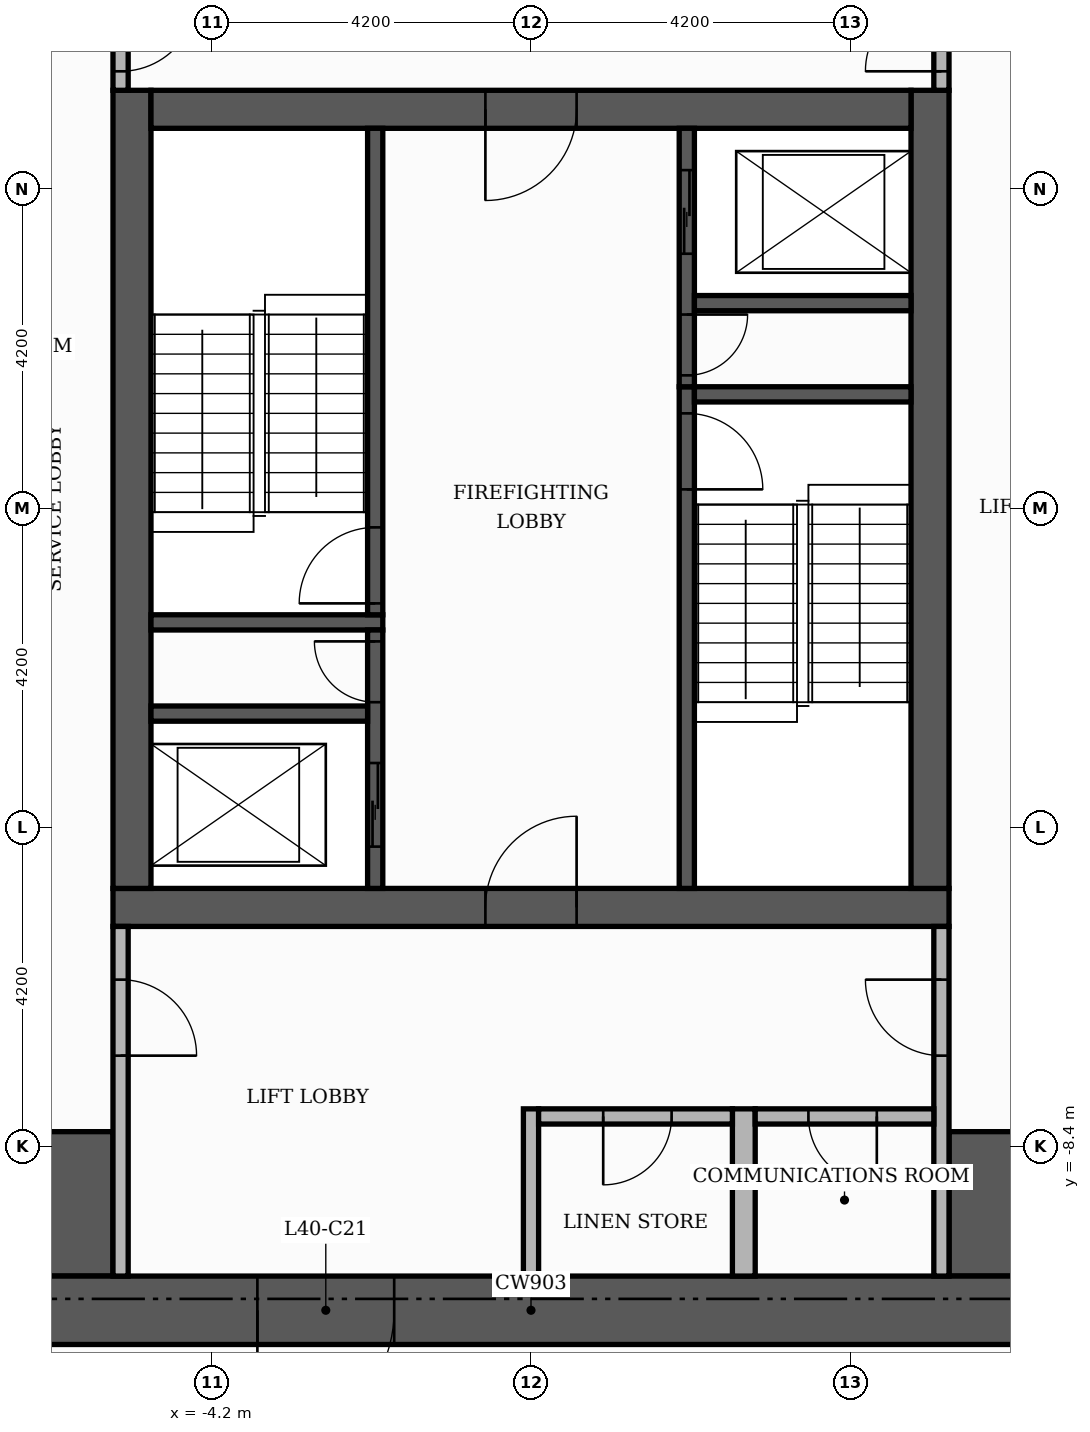
"""IFC4 building model, lengths in metres.
Left out: names, types, materials, properties, quantities, classifications, styles, units other than length and angle.
Written with IfcOpenShell. Run it as: python <this file> out.ifc"""

import sys

from ifc_helpers import new_model, si_unit, direction, frame, frame_2d, origin, place, context, subcontext, project, spatial, rectangle, extrude, element, fill, save


model = new_model("IFC4")
c1 = context("Model", 3, precision=1e-05, world=origin(), true_north=direction((0.0, 1.0)))
c2 = subcontext(c1, "Body", "Model", "MODEL_VIEW")
j1 = project(units=[si_unit("LENGTHUNIT", "METRE"), si_unit("PLANEANGLEUNIT", "RADIAN")], contexts=[c1])
p1 = place(None, origin())
s1 = spatial("IfcSite", under=j1, at=p1, CompositionType="ELEMENT")
p2 = place(p1, origin())
s2 = spatial("IfcBuilding", under=s1, at=p2, CompositionType="ELEMENT")
p3 = place(p2, frame((0.0, 0.0, 168.9)))
s3 = spatial("IfcBuildingStorey", under=s2, at=p3, CompositionType="ELEMENT", Elevation=168.9)
p4 = place(p3, frame((-5.5, -5.25, 0.0), z_axis=(0.0, 0.0, 1.0), x_axis=(1.0, 0.0, 0.0)))
e1 = element("IfcWall", 1, at=p4, inside=s3, PredefinedType="SHEAR", context=c2, shape_type="SweptSolid", body=[
    extrude(rectangle(XDim=11.0, YDim=0.5, at=frame_2d((5.5, 0.0))), origin(), (0.0, 0.0, 1.0), 3.48),
])
p5 = place(p4, frame((4.9, 0.0, 0.0)))
e2 = element("IfcOpeningElement", 2, at=p5, cuts=e1, PredefinedType="OPENING", context=c2, shape_type="SweptSolid", body=[
    extrude(rectangle(XDim=1.2, YDim=2.1, at=frame_2d((0.6, 1.05))), frame((0.0, 0.26, 0.0), z_axis=(0.0, -1.0, 0.0), x_axis=(1.0, 0.0, 0.0)), (0.0, 0.0, 1.0), 0.52),
])
for number, where, z_axis, x_axis in (
    (3, (-5.25, -5.0, 0.0), (0.0, 0.0, 1.0), (0.0, 1.0, 0.0)),
    (4, (5.25, -5.0, 0.0), (0.0, 0.0, 1.0), (0.0, 1.0, 0.0)),
):
    element("IfcWall", number, at=place(p3, frame(where, z_axis=z_axis, x_axis=x_axis)), inside=s3, PredefinedType="SHEAR", context=c2, shape_type="SweptSolid", body=[
        extrude(rectangle(XDim=10.5, YDim=0.5, at=frame_2d((5.25, 0.0))), origin(), (0.0, 0.0, 1.0), 3.48),
    ])
p6 = place(p3, frame((-5.0, 5.25, 0.0), z_axis=(0.0, 0.0, 1.0), x_axis=(1.0, 0.0, 0.0)))
e5 = element("IfcWall", 5, at=p6, inside=s3, PredefinedType="SHEAR", context=c2, shape_type="SweptSolid", body=[
    extrude(rectangle(XDim=10.0, YDim=0.5, at=frame_2d((5.0, 0.0))), origin(), (0.0, 0.0, 1.0), 3.48),
])
p7 = place(p6, frame((4.4, 0.0, 0.0)))
e6 = element("IfcOpeningElement", 6, at=p7, cuts=e5, PredefinedType="OPENING", context=c2, shape_type="SweptSolid", body=[
    extrude(rectangle(XDim=1.2, YDim=2.1, at=frame_2d((0.6, 1.05))), frame((0.0, 0.26, 0.0), z_axis=(0.0, -1.0, 0.0), x_axis=(1.0, 0.0, 0.0)), (0.0, 0.0, 1.0), 0.52),
])
for number, where, z_axis, x_axis in (
    (7, (-10.1, -9.15, 0.0), (0.0, 0.0, 1.0), (1.0, 0.0, 0.0)),
    (8, (5.5, -9.15, 0.0), (0.0, 0.0, 1.0), (1.0, 0.0, 0.0)),
):
    element("IfcWall", number, at=place(p3, frame(where, z_axis=z_axis, x_axis=x_axis)), inside=s3, PredefinedType="SHEAR", context=c2, shape_type="SweptSolid", body=[
        extrude(rectangle(XDim=4.6, YDim=1.9, at=frame_2d((2.3, 0.0))), origin(), (0.0, 0.0, 1.0), 3.48),
    ])
p8 = place(p3, frame((2.05, -5.0, 0.0), z_axis=(0.0, 0.0, 1.0), x_axis=(0.0, 1.0, 0.0)))
e9 = element("IfcWall", 9, at=p8, inside=s3, PredefinedType="SHEAR", context=c2, shape_type="SweptSolid", body=[
    extrude(rectangle(XDim=6.6, YDim=0.2, at=frame_2d((3.3, 0.0))), origin(), (0.0, 0.0, 1.0), 3.48),
])
p9 = place(p8, frame((5.25, 0.0, 0.0)))
e10 = element("IfcOpeningElement", 10, at=p9, cuts=e9, PredefinedType="OPENING", context=c2, shape_type="SweptSolid", body=[
    extrude(rectangle(XDim=1.0, YDim=2.1, at=frame_2d((0.5, 1.05))), frame((0.0, 0.11, 0.0), z_axis=(0.0, -1.0, 0.0), x_axis=(1.0, 0.0, 0.0)), (0.0, 0.0, 1.0), 0.22),
])
p10 = place(p3, frame((-5.0, -1.5, 0.0), z_axis=(0.0, 0.0, 1.0), x_axis=(1.0, 0.0, 0.0)))
e11 = element("IfcWall", 11, at=p10, inside=s3, PredefinedType="SHEAR", context=c2, shape_type="SweptSolid", body=[
    extrude(rectangle(XDim=3.05, YDim=0.2, at=frame_2d((1.525, 0.0))), origin(), (0.0, 0.0, 1.0), 3.48),
])
p11 = place(p3, frame((-2.05, -1.4, 0.0), z_axis=(0.0, 0.0, 1.0), x_axis=(0.0, 1.0, 0.0)))
e12 = element("IfcWall", 12, at=p11, inside=s3, PredefinedType="SHEAR", context=c2, shape_type="SweptSolid", body=[
    extrude(rectangle(XDim=6.4, YDim=0.2, at=frame_2d((3.2, 0.0))), origin(), (0.0, 0.0, 1.0), 3.48),
])
p12 = place(p11, frame((0.15, 0.0, 0.0)))
e13 = element("IfcOpeningElement", 13, at=p12, cuts=e12, PredefinedType="OPENING", context=c2, shape_type="SweptSolid", body=[
    extrude(rectangle(XDim=1.0, YDim=2.1, at=frame_2d((0.5, 1.05))), frame((0.0, 0.11, 0.0), z_axis=(0.0, -1.0, 0.0), x_axis=(1.0, 0.0, 0.0)), (0.0, 0.0, 1.0), 0.22),
])
p13 = place(p3, frame((2.15, 1.5, 0.0), z_axis=(0.0, 0.0, 1.0), x_axis=(1.0, 0.0, 0.0)))
e14 = element("IfcWall", 14, at=p13, inside=s3, PredefinedType="SHEAR", context=c2, shape_type="SweptSolid", body=[
    extrude(rectangle(XDim=2.85, YDim=0.2, at=frame_2d((1.425, 0.0))), origin(), (0.0, 0.0, 1.0), 3.48),
])
p14 = place(p3, frame((-2.05, -5.0, 0.0), z_axis=(0.0, 0.0, 1.0), x_axis=(0.0, 1.0, 0.0)))
e15 = element("IfcWall", 15, at=p14, inside=s3, PredefinedType="SHEAR", context=c2, shape_type="SweptSolid", body=[
    extrude(rectangle(XDim=3.4, YDim=0.2, at=frame_2d((1.7, 0.0))), origin(), (0.0, 0.0, 1.0), 3.48),
])
p15 = place(p14, frame((0.55, 0.0, 0.0)))
e16 = element("IfcOpeningElement", 16, at=p15, cuts=e15, PredefinedType="OPENING", context=c2, shape_type="SweptSolid", body=[
    extrude(rectangle(XDim=1.1, YDim=2.1, at=frame_2d((0.55, 1.05))), frame((0.0, 0.11, 0.0), z_axis=(0.0, -1.0, 0.0), x_axis=(1.0, 0.0, 0.0)), (0.0, 0.0, 1.0), 0.22),
])
p16 = place(p14, frame((2.45, 0.0, 0.0)))
e17 = element("IfcOpeningElement", 17, at=p16, cuts=e15, PredefinedType="OPENING", context=c2, shape_type="SweptSolid", body=[
    extrude(rectangle(XDim=0.8, YDim=2.1, at=frame_2d((0.4, 1.05))), frame((0.0, 0.11, 0.0), z_axis=(0.0, -1.0, 0.0), x_axis=(1.0, 0.0, 0.0)), (0.0, 0.0, 1.0), 0.22),
])
p17 = place(p3, frame((-5.0, -2.7, 0.0), z_axis=(0.0, 0.0, 1.0), x_axis=(1.0, 0.0, 0.0)))
e18 = element("IfcWall", 18, at=p17, inside=s3, PredefinedType="SHEAR", context=c2, shape_type="SweptSolid", body=[
    extrude(rectangle(XDim=2.85, YDim=0.2, at=frame_2d((1.425, 0.0))), origin(), (0.0, 0.0, 1.0), 3.48),
])
p18 = place(p3, frame((2.05, 1.6, 0.0), z_axis=(0.0, 0.0, 1.0), x_axis=(0.0, 1.0, 0.0)))
e19 = element("IfcWall", 19, at=p18, inside=s3, PredefinedType="SHEAR", context=c2, shape_type="SweptSolid", body=[
    extrude(rectangle(XDim=3.4, YDim=0.2, at=frame_2d((1.7, 0.0))), origin(), (0.0, 0.0, 1.0), 3.48),
])
p19 = place(p18, frame((1.75, 0.0, 0.0)))
e20 = element("IfcOpeningElement", 20, at=p19, cuts=e19, PredefinedType="OPENING", context=c2, shape_type="SweptSolid", body=[
    extrude(rectangle(XDim=1.1, YDim=2.1, at=frame_2d((0.55, 1.05))), frame((0.0, 0.11, 0.0), z_axis=(0.0, -1.0, 0.0), x_axis=(1.0, 0.0, 0.0)), (0.0, 0.0, 1.0), 0.22),
])
p20 = place(p18, frame((0.15, 0.0, 0.0)))
e21 = element("IfcOpeningElement", 21, at=p20, cuts=e19, PredefinedType="OPENING", context=c2, shape_type="SweptSolid", body=[
    extrude(rectangle(XDim=0.8, YDim=2.1, at=frame_2d((0.4, 1.05))), frame((0.0, 0.11, 0.0), z_axis=(0.0, -1.0, 0.0), x_axis=(1.0, 0.0, 0.0)), (0.0, 0.0, 1.0), 0.22),
])
p21 = place(p3, frame((2.15, 2.7, 0.0), z_axis=(0.0, 0.0, 1.0), x_axis=(1.0, 0.0, 0.0)))
e22 = element("IfcWall", 22, at=p21, inside=s3, PredefinedType="SHEAR", context=c2, shape_type="SweptSolid", body=[
    extrude(rectangle(XDim=2.85, YDim=0.2, at=frame_2d((1.425, 0.0))), origin(), (0.0, 0.0, 1.0), 3.48),
])
p22 = place(p3, frame((-11.0, -10.55, 0.0), z_axis=(0.0, 0.0, 1.0), x_axis=(1.0, 0.0, 0.0)))
e23 = element("IfcWall", 23, at=p22, inside=s3, PredefinedType="SHEAR", context=c2, shape_type="SweptSolid", body=[
    extrude(rectangle(XDim=22.0, YDim=0.9, at=frame_2d((11.0, 0.0))), origin(), (0.0, 0.0, 1.0), 3.48),
])
p23 = place(p22, frame((7.4, 0.0, 0.0)))
e24 = element("IfcOpeningElement", 24, at=p23, cuts=e23, PredefinedType="OPENING", context=c2, shape_type="SweptSolid", body=[
    extrude(rectangle(XDim=1.8, YDim=2.2, at=frame_2d((0.9, 1.1))), frame((0.0, 0.46, 0.0), z_axis=(0.0, -1.0, 0.0), x_axis=(1.0, 0.0, 0.0)), (0.0, 0.0, 1.0), 0.92),
])
p24 = place(p3, frame((-5.4, -10.1, 0.0), z_axis=(0.0, 0.0, 1.0), x_axis=(0.0, 1.0, 0.0)))
e25 = element("IfcWall", 25, at=p24, inside=s3, PredefinedType="PARTITIONING", context=c2, shape_type="SweptSolid", body=[
    extrude(rectangle(XDim=4.6, YDim=0.2, at=frame_2d((2.3, 0.0))), origin(), (0.0, 0.0, 1.0), 3.48),
])
p25 = place(p24, frame((2.9, 0.0, 0.0)))
e26 = element("IfcOpeningElement", 26, at=p25, cuts=e25, PredefinedType="OPENING", context=c2, shape_type="SweptSolid", body=[
    extrude(rectangle(XDim=1.0, YDim=2.1, at=frame_2d((0.5, 1.05))), frame((0.0, 0.11, 0.0), z_axis=(0.0, -1.0, 0.0), x_axis=(1.0, 0.0, 0.0)), (0.0, 0.0, 1.0), 0.22),
])
p26 = place(p3, frame((0.0, -10.1, 0.0), z_axis=(0.0, 0.0, 1.0), x_axis=(0.0, 1.0, 0.0)))
e27 = element("IfcWall", 27, at=p26, inside=s3, PredefinedType="PARTITIONING", context=c2, shape_type="SweptSolid", body=[
    extrude(rectangle(XDim=2.2, YDim=0.2, at=frame_2d((1.1, 0.0))), origin(), (0.0, 0.0, 1.0), 3.48),
])
p27 = place(p3, frame((2.8, -10.1, 0.0), z_axis=(0.0, 0.0, 1.0), x_axis=(0.0, 1.0, 0.0)))
e28 = element("IfcWall", 28, at=p27, inside=s3, PredefinedType="PARTITIONING", context=c2, shape_type="SweptSolid", body=[
    extrude(rectangle(XDim=2.2, YDim=0.3, at=frame_2d((1.1, 0.0))), origin(), (0.0, 0.0, 1.0), 3.48),
])
p28 = place(p3, frame((5.4, -10.1, 0.0), z_axis=(0.0, 0.0, 1.0), x_axis=(0.0, 1.0, 0.0)))
e29 = element("IfcWall", 29, at=p28, inside=s3, PredefinedType="PARTITIONING", context=c2, shape_type="SweptSolid", body=[
    extrude(rectangle(XDim=4.6, YDim=0.2, at=frame_2d((2.3, 0.0))), origin(), (0.0, 0.0, 1.0), 3.48),
])
p29 = place(p28, frame((2.9, 0.0, 0.0)))
e30 = element("IfcOpeningElement", 30, at=p29, cuts=e29, PredefinedType="OPENING", context=c2, shape_type="SweptSolid", body=[
    extrude(rectangle(XDim=1.0, YDim=2.1, at=frame_2d((0.5, 1.05))), frame((0.0, 0.11, 0.0), z_axis=(0.0, -1.0, 0.0), x_axis=(1.0, 0.0, 0.0)), (0.0, 0.0, 1.0), 0.22),
])
p30 = place(p3, frame((0.1, -8.0, 0.0), z_axis=(0.0, 0.0, 1.0), x_axis=(1.0, 0.0, 0.0)))
e31 = element("IfcWall", 31, at=p30, inside=s3, PredefinedType="PARTITIONING", context=c2, shape_type="SweptSolid", body=[
    extrude(rectangle(XDim=2.55, YDim=0.2, at=frame_2d((1.275, 0.0))), origin(), (0.0, 0.0, 1.0), 3.48),
])
p31 = place(p30, frame((0.85, 0.0, 0.0)))
e32 = element("IfcOpeningElement", 32, at=p31, cuts=e31, PredefinedType="OPENING", context=c2, shape_type="SweptSolid", body=[
    extrude(rectangle(XDim=0.9, YDim=2.1, at=frame_2d((0.45, 1.05))), frame((0.0, 0.11, 0.0), z_axis=(0.0, -1.0, 0.0), x_axis=(1.0, 0.0, 0.0)), (0.0, 0.0, 1.0), 0.22),
])
p32 = place(p3, frame((2.95, -8.0, 0.0), z_axis=(0.0, 0.0, 1.0), x_axis=(1.0, 0.0, 0.0)))
e33 = element("IfcWall", 33, at=p32, inside=s3, PredefinedType="PARTITIONING", context=c2, shape_type="SweptSolid", body=[
    extrude(rectangle(XDim=2.35, YDim=0.2, at=frame_2d((1.175, 0.0))), origin(), (0.0, 0.0, 1.0), 3.48),
])
p33 = place(p32, frame((0.7, 0.0, 0.0)))
e34 = element("IfcOpeningElement", 34, at=p33, cuts=e33, PredefinedType="OPENING", context=c2, shape_type="SweptSolid", body=[
    extrude(rectangle(XDim=0.9, YDim=2.1, at=frame_2d((0.45, 1.05))), frame((0.0, 0.11, 0.0), z_axis=(0.0, -1.0, 0.0), x_axis=(1.0, 0.0, 0.0)), (0.0, 0.0, 1.0), 0.22),
])
p34 = place(p3, frame((-5.4, 5.5, 0.0), z_axis=(0.0, 0.0, 1.0), x_axis=(0.0, 1.0, 0.0)))
e35 = element("IfcWall", 35, at=p34, inside=s3, PredefinedType="PARTITIONING", context=c2, shape_type="SweptSolid", body=[
    extrude(rectangle(XDim=1.55, YDim=0.2, at=frame_2d((0.775, 0.0))), origin(), (0.0, 0.0, 1.0), 3.48),
])
p35 = place(p34, frame((0.25, 0.0, 0.0)))
e36 = element("IfcOpeningElement", 36, at=p35, cuts=e35, PredefinedType="OPENING", context=c2, shape_type="SweptSolid", body=[
    extrude(rectangle(XDim=1.0, YDim=2.1, at=frame_2d((0.5, 1.05))), frame((0.0, 0.11, 0.0), z_axis=(0.0, -1.0, 0.0), x_axis=(1.0, 0.0, 0.0)), (0.0, 0.0, 1.0), 0.22),
])
p36 = place(p3, frame((5.4, 5.5, 0.0), z_axis=(0.0, 0.0, 1.0), x_axis=(0.0, 1.0, 0.0)))
e37 = element("IfcWall", 37, at=p36, inside=s3, PredefinedType="PARTITIONING", context=c2, shape_type="SweptSolid", body=[
    extrude(rectangle(XDim=4.6, YDim=0.2, at=frame_2d((2.3, 0.0))), origin(), (0.0, 0.0, 1.0), 3.48),
])
p37 = place(p36, frame((0.25, 0.0, 0.0)))
e38 = element("IfcOpeningElement", 38, at=p37, cuts=e37, PredefinedType="OPENING", context=c2, shape_type="SweptSolid", body=[
    extrude(rectangle(XDim=1.0, YDim=2.1, at=frame_2d((0.5, 1.05))), frame((0.0, 0.11, 0.0), z_axis=(0.0, -1.0, 0.0), x_axis=(1.0, 0.0, 0.0)), (0.0, 0.0, 1.0), 0.22),
])
p38 = place(p19, origin())
e39 = element("IfcDoor", 39, at=p38, inside=s3, OperationType="SLIDING_TO_LEFT", PredefinedType="DOOR", context=c2, shape_type="SweptSolid", body=[
    extrude(rectangle(XDim=1.1, YDim=2.1, at=frame_2d((0.55, 1.05))), frame((0.0, 0.025, 0.0), z_axis=(0.0, -1.0, 0.0), x_axis=(1.0, 0.0, 0.0)), (0.0, 0.0, 1.0), 0.05),
])
fill(e20, e39)
p39 = place(p15, origin())
e40 = element("IfcDoor", 40, at=p39, inside=s3, OperationType="SLIDING_TO_LEFT", PredefinedType="DOOR", context=c2, shape_type="SweptSolid", body=[
    extrude(rectangle(XDim=1.1, YDim=2.1, at=frame_2d((0.55, 1.05))), frame((0.0, 0.025, 0.0), z_axis=(0.0, -1.0, 0.0), x_axis=(1.0, 0.0, 0.0)), (0.0, 0.0, 1.0), 0.05),
])
fill(e16, e40)
p40 = place(p12, origin())
e41 = element("IfcDoor", 41, at=p40, inside=s3, OperationType="SINGLE_SWING_LEFT", PredefinedType="DOOR", context=c2, shape_type="SweptSolid", body=[
    extrude(rectangle(XDim=1.0, YDim=2.1, at=frame_2d((0.5, 1.05))), frame((0.0, 0.025, 0.0), z_axis=(0.0, -1.0, 0.0), x_axis=(1.0, 0.0, 0.0)), (0.0, 0.0, 1.0), 0.05),
])
fill(e13, e41)
p41 = place(p9, frame((1.0, 0.0, 0.0), z_axis=(0.0, 0.0, 1.0), x_axis=(-1.0, 0.0, 0.0)))
e42 = element("IfcDoor", 42, at=p41, inside=s3, OperationType="SINGLE_SWING_LEFT", PredefinedType="DOOR", context=c2, shape_type="SweptSolid", body=[
    extrude(rectangle(XDim=1.0, YDim=2.1, at=frame_2d((0.5, 1.05))), frame((0.0, 0.025, 0.0), z_axis=(0.0, -1.0, 0.0), x_axis=(1.0, 0.0, 0.0)), (0.0, 0.0, 1.0), 0.05),
])
fill(e10, e42)
p42 = place(p20, frame((0.8, 0.0, 0.0), z_axis=(0.0, 0.0, 1.0), x_axis=(-1.0, 0.0, 0.0)))
e43 = element("IfcDoor", 43, at=p42, inside=s3, OperationType="SINGLE_SWING_RIGHT", PredefinedType="DOOR", context=c2, shape_type="SweptSolid", body=[
    extrude(rectangle(XDim=0.8, YDim=2.1, at=frame_2d((0.4, 1.05))), frame((0.0, 0.025, 0.0), z_axis=(0.0, -1.0, 0.0), x_axis=(1.0, 0.0, 0.0)), (0.0, 0.0, 1.0), 0.05),
])
fill(e21, e43)
p43 = place(p16, origin())
e44 = element("IfcDoor", 44, at=p43, inside=s3, OperationType="SINGLE_SWING_RIGHT", PredefinedType="DOOR", context=c2, shape_type="SweptSolid", body=[
    extrude(rectangle(XDim=0.8, YDim=2.1, at=frame_2d((0.4, 1.05))), frame((0.0, 0.025, 0.0), z_axis=(0.0, -1.0, 0.0), x_axis=(1.0, 0.0, 0.0)), (0.0, 0.0, 1.0), 0.05),
])
fill(e17, e44)
p44 = place(p7, frame((1.2, 0.0, 0.0), z_axis=(0.0, 0.0, 1.0), x_axis=(-1.0, 0.0, 0.0)))
e45 = element("IfcDoor", 45, at=p44, inside=s3, OperationType="SINGLE_SWING_LEFT", PredefinedType="DOOR", context=c2, shape_type="SweptSolid", body=[
    extrude(rectangle(XDim=1.2, YDim=2.1, at=frame_2d((0.6, 1.05))), frame((0.0, 0.025, 0.0), z_axis=(0.0, -1.0, 0.0), x_axis=(1.0, 0.0, 0.0)), (0.0, 0.0, 1.0), 0.05),
])
fill(e6, e45)
p45 = place(p5, origin())
e46 = element("IfcDoor", 46, at=p45, inside=s3, OperationType="SINGLE_SWING_RIGHT", PredefinedType="DOOR", context=c2, shape_type="SweptSolid", body=[
    extrude(rectangle(XDim=1.2, YDim=2.1, at=frame_2d((0.6, 1.05))), frame((0.0, 0.025, 0.0), z_axis=(0.0, -1.0, 0.0), x_axis=(1.0, 0.0, 0.0)), (0.0, 0.0, 1.0), 0.05),
])
fill(e2, e46)
p46 = place(p35, frame((1.0, 0.0, 0.0), z_axis=(0.0, 0.0, 1.0), x_axis=(-1.0, 0.0, 0.0)))
e47 = element("IfcDoor", 47, at=p46, inside=s3, OperationType="SINGLE_SWING_RIGHT", PredefinedType="DOOR", context=c2, shape_type="SweptSolid", body=[
    extrude(rectangle(XDim=1.0, YDim=2.1, at=frame_2d((0.5, 1.05))), frame((0.0, 0.025, 0.0), z_axis=(0.0, -1.0, 0.0), x_axis=(1.0, 0.0, 0.0)), (0.0, 0.0, 1.0), 0.05),
])
fill(e36, e47)
p47 = place(p37, origin())
e48 = element("IfcDoor", 48, at=p47, inside=s3, OperationType="SINGLE_SWING_LEFT", PredefinedType="DOOR", context=c2, shape_type="SweptSolid", body=[
    extrude(rectangle(XDim=1.0, YDim=2.1, at=frame_2d((0.5, 1.05))), frame((0.0, 0.025, 0.0), z_axis=(0.0, -1.0, 0.0), x_axis=(1.0, 0.0, 0.0)), (0.0, 0.0, 1.0), 0.05),
])
fill(e38, e48)
p48 = place(p25, frame((1.0, 0.0, 0.0), z_axis=(0.0, 0.0, 1.0), x_axis=(-1.0, 0.0, 0.0)))
e49 = element("IfcDoor", 49, at=p48, inside=s3, OperationType="SINGLE_SWING_LEFT", PredefinedType="DOOR", context=c2, shape_type="SweptSolid", body=[
    extrude(rectangle(XDim=1.0, YDim=2.1, at=frame_2d((0.5, 1.05))), frame((0.0, 0.025, 0.0), z_axis=(0.0, -1.0, 0.0), x_axis=(1.0, 0.0, 0.0)), (0.0, 0.0, 1.0), 0.05),
])
fill(e26, e49)
p49 = place(p29, origin())
e50 = element("IfcDoor", 50, at=p49, inside=s3, OperationType="SINGLE_SWING_RIGHT", PredefinedType="DOOR", context=c2, shape_type="SweptSolid", body=[
    extrude(rectangle(XDim=1.0, YDim=2.1, at=frame_2d((0.5, 1.05))), frame((0.0, 0.025, 0.0), z_axis=(0.0, -1.0, 0.0), x_axis=(1.0, 0.0, 0.0)), (0.0, 0.0, 1.0), 0.05),
])
fill(e30, e50)
p50 = place(p23, frame((1.8, 0.0, 0.0), z_axis=(0.0, 0.0, 1.0), x_axis=(-1.0, 0.0, 0.0)))
e51 = element("IfcDoor", 51, at=p50, inside=s3, OperationType="DOUBLE_DOOR_SINGLE_SWING", PredefinedType="DOOR", context=c2, shape_type="SweptSolid", body=[
    extrude(rectangle(XDim=1.8, YDim=2.2, at=frame_2d((0.9, 1.1))), frame((0.0, 0.025, 0.0), z_axis=(0.0, -1.0, 0.0), x_axis=(1.0, 0.0, 0.0)), (0.0, 0.0, 1.0), 0.05),
])
fill(e24, e51)
p51 = place(p31, frame((0.9, 0.0, 0.0), z_axis=(0.0, 0.0, 1.0), x_axis=(-1.0, 0.0, 0.0)))
e52 = element("IfcDoor", 52, at=p51, inside=s3, OperationType="SINGLE_SWING_LEFT", PredefinedType="DOOR", context=c2, shape_type="SweptSolid", body=[
    extrude(rectangle(XDim=0.9, YDim=2.1, at=frame_2d((0.45, 1.05))), frame((0.0, 0.025, 0.0), z_axis=(0.0, -1.0, 0.0), x_axis=(1.0, 0.0, 0.0)), (0.0, 0.0, 1.0), 0.05),
])
fill(e32, e52)
p52 = place(p33, frame((0.9, 0.0, 0.0), z_axis=(0.0, 0.0, 1.0), x_axis=(-1.0, 0.0, 0.0)))
e53 = element("IfcDoor", 53, at=p52, inside=s3, OperationType="SINGLE_SWING_RIGHT", PredefinedType="DOOR", context=c2, shape_type="SweptSolid", body=[
    extrude(rectangle(XDim=0.9, YDim=2.1, at=frame_2d((0.45, 1.05))), frame((0.0, 0.025, 0.0), z_axis=(0.0, -1.0, 0.0), x_axis=(1.0, 0.0, 0.0)), (0.0, 0.0, 1.0), 0.05),
])
fill(e34, e53)
save(model, sys.argv[1])
